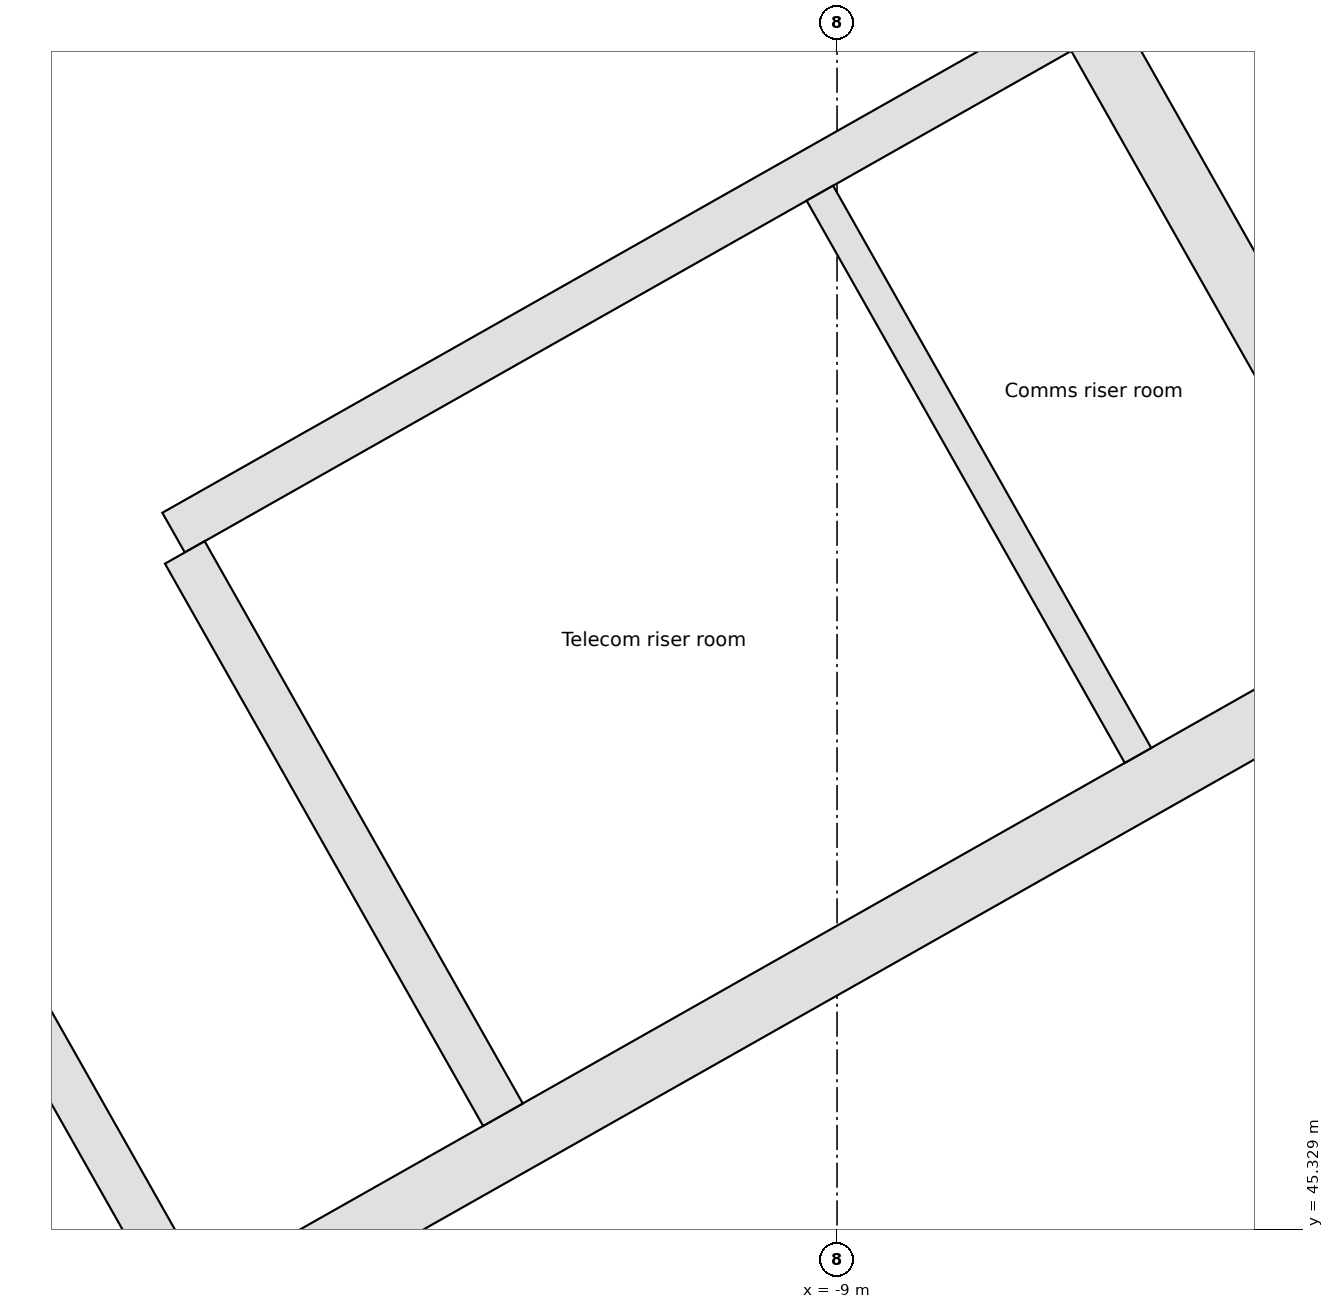
"""IFC4 building model, lengths in metres.
Left out: names, types, materials, properties, quantities, classifications, styles, units other than length and angle.
Written with IfcOpenShell. Run it as: python <this file> out.ifc"""

import sys

from ifc_helpers import new_model, si_unit, direction, frame, frame_2d, origin, place, context, subcontext, project, spatial, rectangle, extrude, element, fill, save


model = new_model("IFC4")
c1 = context("Model", 3, precision=1e-05, world=origin(), true_north=direction((0.0, 1.0)))
c2 = subcontext(c1, "Body", "Model", "MODEL_VIEW")
j1 = project(units=[si_unit("LENGTHUNIT", "METRE"), si_unit("PLANEANGLEUNIT", "RADIAN")], contexts=[c1])
p1 = place(None, origin())
s1 = spatial("IfcSite", under=j1, at=p1, CompositionType="ELEMENT")
p2 = place(p1, origin())
s2 = spatial("IfcBuilding", under=s1, at=p2, CompositionType="ELEMENT")
p3 = place(p2, frame((0.0, 0.0, 277.9)))
s3 = spatial("IfcBuildingStorey", under=s2, at=p3, CompositionType="ELEMENT", Elevation=277.9)
p4 = place(p3, frame((-58.732, 38.771, 0.0), z_axis=(0.0, 0.0, 1.0), x_axis=(0.870355615581, 0.492423702137, 0.0)))
e1 = element("IfcWall", 1, at=p4, inside=s3, PredefinedType="STANDARD", context=c2, shape_type="SweptSolid", body=[
    extrude(rectangle(XDim=64.052, YDim=0.25, at=frame_2d((32.026, 0.0))), origin(), (0.0, 0.0, 1.0), 3.52),
])
p5 = place(p4, frame((61.259, 0.0, 0.8)))
e2 = element("IfcOpeningElement", 2, at=p5, cuts=e1, PredefinedType="OPENING", context=c2, shape_type="SweptSolid", body=[
    extrude(rectangle(XDim=2.4, YDim=2.2, at=frame_2d((1.2, 1.1))), frame((0.0, 0.135, 0.0), z_axis=(0.0, -1.0, 0.0), x_axis=(1.0, 0.0, 0.0)), (0.0, 0.0, 1.0), 0.27),
])
p6 = place(p4, frame((58.216, 0.0, 0.8)))
e3 = element("IfcOpeningElement", 3, at=p6, cuts=e1, PredefinedType="OPENING", context=c2, shape_type="SweptSolid", body=[
    extrude(rectangle(XDim=2.4, YDim=2.2, at=frame_2d((1.2, 1.1))), frame((0.0, 0.135, 0.0), z_axis=(0.0, -1.0, 0.0), x_axis=(1.0, 0.0, 0.0)), (0.0, 0.0, 1.0), 0.27),
])
p7 = place(p4, frame((55.173, 0.0, 0.8)))
e4 = element("IfcOpeningElement", 4, at=p7, cuts=e1, PredefinedType="OPENING", context=c2, shape_type="SweptSolid", body=[
    extrude(rectangle(XDim=2.4, YDim=2.2, at=frame_2d((1.2, 1.1))), frame((0.0, 0.135, 0.0), z_axis=(0.0, -1.0, 0.0), x_axis=(1.0, 0.0, 0.0)), (0.0, 0.0, 1.0), 0.27),
])
p8 = place(p4, frame((52.129, 0.0, 0.8)))
e5 = element("IfcOpeningElement", 5, at=p8, cuts=e1, PredefinedType="OPENING", context=c2, shape_type="SweptSolid", body=[
    extrude(rectangle(XDim=2.4, YDim=2.2, at=frame_2d((1.2, 1.1))), frame((0.0, 0.135, 0.0), z_axis=(0.0, -1.0, 0.0), x_axis=(1.0, 0.0, 0.0)), (0.0, 0.0, 1.0), 0.27),
])
p9 = place(p4, frame((49.086, 0.0, 0.8)))
e6 = element("IfcOpeningElement", 6, at=p9, cuts=e1, PredefinedType="OPENING", context=c2, shape_type="SweptSolid", body=[
    extrude(rectangle(XDim=2.4, YDim=2.2, at=frame_2d((1.2, 1.1))), frame((0.0, 0.135, 0.0), z_axis=(0.0, -1.0, 0.0), x_axis=(1.0, 0.0, 0.0)), (0.0, 0.0, 1.0), 0.27),
])
p10 = place(p4, frame((46.043, 0.0, 0.8)))
e7 = element("IfcOpeningElement", 7, at=p10, cuts=e1, PredefinedType="OPENING", context=c2, shape_type="SweptSolid", body=[
    extrude(rectangle(XDim=2.4, YDim=2.2, at=frame_2d((1.2, 1.1))), frame((0.0, 0.135, 0.0), z_axis=(0.0, -1.0, 0.0), x_axis=(1.0, 0.0, 0.0)), (0.0, 0.0, 1.0), 0.27),
])
p11 = place(p4, frame((43.0, 0.0, 0.8)))
e8 = element("IfcOpeningElement", 8, at=p11, cuts=e1, PredefinedType="OPENING", context=c2, shape_type="SweptSolid", body=[
    extrude(rectangle(XDim=2.4, YDim=2.2, at=frame_2d((1.2, 1.1))), frame((0.0, 0.135, 0.0), z_axis=(0.0, -1.0, 0.0), x_axis=(1.0, 0.0, 0.0)), (0.0, 0.0, 1.0), 0.27),
])
p12 = place(p4, frame((39.956, 0.0, 0.8)))
e9 = element("IfcOpeningElement", 9, at=p12, cuts=e1, PredefinedType="OPENING", context=c2, shape_type="SweptSolid", body=[
    extrude(rectangle(XDim=2.4, YDim=2.2, at=frame_2d((1.2, 1.1))), frame((0.0, 0.135, 0.0), z_axis=(0.0, -1.0, 0.0), x_axis=(1.0, 0.0, 0.0)), (0.0, 0.0, 1.0), 0.27),
])
p13 = place(p4, frame((36.913, 0.0, 0.8)))
e10 = element("IfcOpeningElement", 10, at=p13, cuts=e1, PredefinedType="OPENING", context=c2, shape_type="SweptSolid", body=[
    extrude(rectangle(XDim=2.4, YDim=2.2, at=frame_2d((1.2, 1.1))), frame((0.0, 0.135, 0.0), z_axis=(0.0, -1.0, 0.0), x_axis=(1.0, 0.0, 0.0)), (0.0, 0.0, 1.0), 0.27),
])
p14 = place(p4, frame((33.87, 0.0, 0.8)))
e11 = element("IfcOpeningElement", 11, at=p14, cuts=e1, PredefinedType="OPENING", context=c2, shape_type="SweptSolid", body=[
    extrude(rectangle(XDim=2.4, YDim=2.2, at=frame_2d((1.2, 1.1))), frame((0.0, 0.135, 0.0), z_axis=(0.0, -1.0, 0.0), x_axis=(1.0, 0.0, 0.0)), (0.0, 0.0, 1.0), 0.27),
])
p15 = place(p4, frame((30.826, 0.0, 0.8)))
e12 = element("IfcOpeningElement", 12, at=p15, cuts=e1, PredefinedType="OPENING", context=c2, shape_type="SweptSolid", body=[
    extrude(rectangle(XDim=2.4, YDim=2.2, at=frame_2d((1.2, 1.1))), frame((0.0, 0.135, 0.0), z_axis=(0.0, -1.0, 0.0), x_axis=(1.0, 0.0, 0.0)), (0.0, 0.0, 1.0), 0.27),
])
p16 = place(p4, frame((27.783, 0.0, 0.8)))
e13 = element("IfcOpeningElement", 13, at=p16, cuts=e1, PredefinedType="OPENING", context=c2, shape_type="SweptSolid", body=[
    extrude(rectangle(XDim=2.4, YDim=2.2, at=frame_2d((1.2, 1.1))), frame((0.0, 0.135, 0.0), z_axis=(0.0, -1.0, 0.0), x_axis=(1.0, 0.0, 0.0)), (0.0, 0.0, 1.0), 0.27),
])
p17 = place(p4, frame((24.74, 0.0, 0.8)))
e14 = element("IfcOpeningElement", 14, at=p17, cuts=e1, PredefinedType="OPENING", context=c2, shape_type="SweptSolid", body=[
    extrude(rectangle(XDim=2.4, YDim=2.2, at=frame_2d((1.2, 1.1))), frame((0.0, 0.135, 0.0), z_axis=(0.0, -1.0, 0.0), x_axis=(1.0, 0.0, 0.0)), (0.0, 0.0, 1.0), 0.27),
])
p18 = place(p4, frame((21.696, 0.0, 0.8)))
e15 = element("IfcOpeningElement", 15, at=p18, cuts=e1, PredefinedType="OPENING", context=c2, shape_type="SweptSolid", body=[
    extrude(rectangle(XDim=2.4, YDim=2.2, at=frame_2d((1.2, 1.1))), frame((0.0, 0.135, 0.0), z_axis=(0.0, -1.0, 0.0), x_axis=(1.0, 0.0, 0.0)), (0.0, 0.0, 1.0), 0.27),
])
p19 = place(p4, frame((18.653, 0.0, 0.8)))
e16 = element("IfcOpeningElement", 16, at=p19, cuts=e1, PredefinedType="OPENING", context=c2, shape_type="SweptSolid", body=[
    extrude(rectangle(XDim=2.4, YDim=2.2, at=frame_2d((1.2, 1.1))), frame((0.0, 0.135, 0.0), z_axis=(0.0, -1.0, 0.0), x_axis=(1.0, 0.0, 0.0)), (0.0, 0.0, 1.0), 0.27),
])
p20 = place(p4, frame((15.61, 0.0, 0.8)))
e17 = element("IfcOpeningElement", 17, at=p20, cuts=e1, PredefinedType="OPENING", context=c2, shape_type="SweptSolid", body=[
    extrude(rectangle(XDim=2.4, YDim=2.2, at=frame_2d((1.2, 1.1))), frame((0.0, 0.135, 0.0), z_axis=(0.0, -1.0, 0.0), x_axis=(1.0, 0.0, 0.0)), (0.0, 0.0, 1.0), 0.27),
])
p21 = place(p4, frame((12.567, 0.0, 0.8)))
e18 = element("IfcOpeningElement", 18, at=p21, cuts=e1, PredefinedType="OPENING", context=c2, shape_type="SweptSolid", body=[
    extrude(rectangle(XDim=2.4, YDim=2.2, at=frame_2d((1.2, 1.1))), frame((0.0, 0.135, 0.0), z_axis=(0.0, -1.0, 0.0), x_axis=(1.0, 0.0, 0.0)), (0.0, 0.0, 1.0), 0.27),
])
p22 = place(p4, frame((9.523, 0.0, 0.8)))
e19 = element("IfcOpeningElement", 19, at=p22, cuts=e1, PredefinedType="OPENING", context=c2, shape_type="SweptSolid", body=[
    extrude(rectangle(XDim=2.4, YDim=2.2, at=frame_2d((1.2, 1.1))), frame((0.0, 0.135, 0.0), z_axis=(0.0, -1.0, 0.0), x_axis=(1.0, 0.0, 0.0)), (0.0, 0.0, 1.0), 0.27),
])
p23 = place(p4, frame((6.48, 0.0, 0.8)))
e20 = element("IfcOpeningElement", 20, at=p23, cuts=e1, PredefinedType="OPENING", context=c2, shape_type="SweptSolid", body=[
    extrude(rectangle(XDim=2.4, YDim=2.2, at=frame_2d((1.2, 1.1))), frame((0.0, 0.135, 0.0), z_axis=(0.0, -1.0, 0.0), x_axis=(1.0, 0.0, 0.0)), (0.0, 0.0, 1.0), 0.27),
])
p24 = place(p4, frame((3.437, 0.0, 0.8)))
e21 = element("IfcOpeningElement", 21, at=p24, cuts=e1, PredefinedType="OPENING", context=c2, shape_type="SweptSolid", body=[
    extrude(rectangle(XDim=2.4, YDim=2.2, at=frame_2d((1.2, 1.1))), frame((0.0, 0.135, 0.0), z_axis=(0.0, -1.0, 0.0), x_axis=(1.0, 0.0, 0.0)), (0.0, 0.0, 1.0), 0.27),
])
p25 = place(p4, frame((0.393, 0.0, 0.8)))
e22 = element("IfcOpeningElement", 22, at=p25, cuts=e1, PredefinedType="OPENING", context=c2, shape_type="SweptSolid", body=[
    extrude(rectangle(XDim=2.4, YDim=2.2, at=frame_2d((1.2, 1.1))), frame((0.0, 0.135, 0.0), z_axis=(0.0, -1.0, 0.0), x_axis=(1.0, 0.0, 0.0)), (0.0, 0.0, 1.0), 0.27),
])
p26 = place(p3, frame((-3.017, 46.293, 0.0), z_axis=(0.0, 0.0, 1.0), x_axis=(-0.870355474887, -0.492423950812, 0.0)))
e23 = element("IfcWall", 23, at=p26, inside=s3, PredefinedType="STANDARD", context=c2, shape_type="SweptSolid", body=[
    extrude(rectangle(XDim=40.34, YDim=0.25, at=frame_2d((20.17, 0.0))), origin(), (0.0, 0.0, 1.0), 3.52),
])
p27 = place(p26, frame((37.428, 0.0, 0.8)))
e24 = element("IfcOpeningElement", 24, at=p27, cuts=e23, PredefinedType="OPENING", context=c2, shape_type="SweptSolid", body=[
    extrude(rectangle(XDim=2.4, YDim=2.2, at=frame_2d((1.2, 1.1))), frame((0.0, 0.135, 0.0), z_axis=(0.0, -1.0, 0.0), x_axis=(1.0, 0.0, 0.0)), (0.0, 0.0, 1.0), 0.27),
])
p28 = place(p26, frame((34.372, 0.0, 0.0)))
e25 = element("IfcOpeningElement", 25, at=p28, cuts=e23, PredefinedType="OPENING", context=c2, shape_type="SweptSolid", body=[
    extrude(rectangle(XDim=1.8, YDim=2.4, at=frame_2d((0.9, 1.2))), frame((0.0, 0.135, 0.0), z_axis=(0.0, -1.0, 0.0), x_axis=(1.0, 0.0, 0.0)), (0.0, 0.0, 1.0), 0.27),
])
p29 = place(p26, frame((30.716, 0.0, 0.8)))
e26 = element("IfcOpeningElement", 26, at=p29, cuts=e23, PredefinedType="OPENING", context=c2, shape_type="SweptSolid", body=[
    extrude(rectangle(XDim=2.4, YDim=2.2, at=frame_2d((1.2, 1.1))), frame((0.0, 0.135, 0.0), z_axis=(0.0, -1.0, 0.0), x_axis=(1.0, 0.0, 0.0)), (0.0, 0.0, 1.0), 0.27),
])
p30 = place(p26, frame((27.36, 0.0, 0.8)))
e27 = element("IfcOpeningElement", 27, at=p30, cuts=e23, PredefinedType="OPENING", context=c2, shape_type="SweptSolid", body=[
    extrude(rectangle(XDim=2.4, YDim=2.2, at=frame_2d((1.2, 1.1))), frame((0.0, 0.135, 0.0), z_axis=(0.0, -1.0, 0.0), x_axis=(1.0, 0.0, 0.0)), (0.0, 0.0, 1.0), 0.27),
])
p31 = place(p26, frame((24.304, 0.0, 0.0)))
e28 = element("IfcOpeningElement", 28, at=p31, cuts=e23, PredefinedType="OPENING", context=c2, shape_type="SweptSolid", body=[
    extrude(rectangle(XDim=1.8, YDim=2.4, at=frame_2d((0.9, 1.2))), frame((0.0, 0.135, 0.0), z_axis=(0.0, -1.0, 0.0), x_axis=(1.0, 0.0, 0.0)), (0.0, 0.0, 1.0), 0.27),
])
p32 = place(p26, frame((20.648, 0.0, 0.8)))
e29 = element("IfcOpeningElement", 29, at=p32, cuts=e23, PredefinedType="OPENING", context=c2, shape_type="SweptSolid", body=[
    extrude(rectangle(XDim=2.4, YDim=2.2, at=frame_2d((1.2, 1.1))), frame((0.0, 0.135, 0.0), z_axis=(0.0, -1.0, 0.0), x_axis=(1.0, 0.0, 0.0)), (0.0, 0.0, 1.0), 0.27),
])
p33 = place(p26, frame((17.292, 0.0, 0.8)))
e30 = element("IfcOpeningElement", 30, at=p33, cuts=e23, PredefinedType="OPENING", context=c2, shape_type="SweptSolid", body=[
    extrude(rectangle(XDim=2.4, YDim=2.2, at=frame_2d((1.2, 1.1))), frame((0.0, 0.135, 0.0), z_axis=(0.0, -1.0, 0.0), x_axis=(1.0, 0.0, 0.0)), (0.0, 0.0, 1.0), 0.27),
])
p34 = place(p26, frame((14.236, 0.0, 0.0)))
e31 = element("IfcOpeningElement", 31, at=p34, cuts=e23, PredefinedType="OPENING", context=c2, shape_type="SweptSolid", body=[
    extrude(rectangle(XDim=1.8, YDim=2.4, at=frame_2d((0.9, 1.2))), frame((0.0, 0.135, 0.0), z_axis=(0.0, -1.0, 0.0), x_axis=(1.0, 0.0, 0.0)), (0.0, 0.0, 1.0), 0.27),
])
p35 = place(p26, frame((10.58, 0.0, 0.8)))
e32 = element("IfcOpeningElement", 32, at=p35, cuts=e23, PredefinedType="OPENING", context=c2, shape_type="SweptSolid", body=[
    extrude(rectangle(XDim=2.4, YDim=2.2, at=frame_2d((1.2, 1.1))), frame((0.0, 0.135, 0.0), z_axis=(0.0, -1.0, 0.0), x_axis=(1.0, 0.0, 0.0)), (0.0, 0.0, 1.0), 0.27),
])
p36 = place(p26, frame((7.224, 0.0, 0.8)))
e33 = element("IfcOpeningElement", 33, at=p36, cuts=e23, PredefinedType="OPENING", context=c2, shape_type="SweptSolid", body=[
    extrude(rectangle(XDim=2.4, YDim=2.2, at=frame_2d((1.2, 1.1))), frame((0.0, 0.135, 0.0), z_axis=(0.0, -1.0, 0.0), x_axis=(1.0, 0.0, 0.0)), (0.0, 0.0, 1.0), 0.27),
])
p37 = place(p26, frame((4.168, 0.0, 0.0)))
e34 = element("IfcOpeningElement", 34, at=p37, cuts=e23, PredefinedType="OPENING", context=c2, shape_type="SweptSolid", body=[
    extrude(rectangle(XDim=1.8, YDim=2.4, at=frame_2d((0.9, 1.2))), frame((0.0, 0.135, 0.0), z_axis=(0.0, -1.0, 0.0), x_axis=(1.0, 0.0, 0.0)), (0.0, 0.0, 1.0), 0.27),
])
p38 = place(p26, frame((0.512, 0.0, 0.8)))
e35 = element("IfcOpeningElement", 35, at=p38, cuts=e23, PredefinedType="OPENING", context=c2, shape_type="SweptSolid", body=[
    extrude(rectangle(XDim=2.4, YDim=2.2, at=frame_2d((1.2, 1.1))), frame((0.0, 0.135, 0.0), z_axis=(0.0, -1.0, 0.0), x_axis=(1.0, 0.0, 0.0)), (0.0, 0.0, 1.0), 0.27),
])
p39 = place(p3, frame((-17.975, 42.017, 0.0), z_axis=(0.0, 0.0, 1.0), x_axis=(0.87034965173, 0.492434243055, 0.0)))
e36 = element("IfcWall", 36, at=p39, inside=s3, PredefinedType="SOLIDWALL", context=c2, shape_type="SweptSolid", body=[
    extrude(rectangle(XDim=15.0, YDim=0.4, at=frame_2d((7.5, 0.0))), origin(), (0.0, 0.0, 1.0), 3.52),
])
p40 = place(p39, frame((6.1, 0.0, 0.0)))
e37 = element("IfcOpeningElement", 37, at=p40, cuts=e36, PredefinedType="OPENING", context=c2, shape_type="SweptSolid", body=[
    extrude(rectangle(XDim=1.2, YDim=2.1, at=frame_2d((0.6, 1.05))), frame((0.0, 0.21, 0.0), z_axis=(0.0, -1.0, 0.0), x_axis=(1.0, 0.0, 0.0)), (0.0, 0.0, 1.0), 0.42),
])
p41 = place(p3, frame((-13.365, 49.911, 0.0), z_axis=(0.0, 0.0, 1.0), x_axis=(0.870347618718, 0.492437836272, 0.0)))
e38 = element("IfcWall", 38, at=p41, inside=s3, PredefinedType="SOLIDWALL", context=c2, shape_type="SweptSolid", body=[
    extrude(rectangle(XDim=6.7, YDim=0.3, at=frame_2d((3.35, 0.0))), origin(), (0.0, 0.0, 1.0), 3.52),
])
p42 = place(p41, frame((1.95, 0.0, 0.0)))
e39 = element("IfcOpeningElement", 39, at=p42, cuts=e38, PredefinedType="OPENING", context=c2, shape_type="SweptSolid", body=[
    extrude(rectangle(XDim=0.9, YDim=2.1, at=frame_2d((0.45, 1.05))), frame((0.0, 0.16, 0.0), z_axis=(0.0, -1.0, 0.0), x_axis=(1.0, 0.0, 0.0)), (0.0, 0.0, 1.0), 0.32),
])
p43 = place(p41, frame((5.35, 0.0, 0.0)))
e40 = element("IfcOpeningElement", 40, at=p43, cuts=e38, PredefinedType="OPENING", context=c2, shape_type="SweptSolid", body=[
    extrude(rectangle(XDim=0.9, YDim=2.1, at=frame_2d((0.45, 1.05))), frame((0.0, 0.16, 0.0), z_axis=(0.0, -1.0, 0.0), x_axis=(1.0, 0.0, 0.0)), (0.0, 0.0, 1.0), 0.32),
])
p44 = place(p3, frame((-15.379, 48.599, 0.0), z_axis=(0.0, 0.0, 1.0), x_axis=(0.492422543467, -0.870356271124, 0.0)))
e41 = element("IfcWall", 41, at=p44, inside=s3, PredefinedType="SOLIDWALL", context=c2, shape_type="SweptSolid", body=[
    extrude(rectangle(XDim=4.25, YDim=0.3, at=frame_2d((2.125, 0.0))), origin(), (0.0, 0.0, 1.0), 3.52),
])
p45 = place(p3, frame((-13.291, 49.781, 0.0), z_axis=(0.0, 0.0, 1.0), x_axis=(0.492397924348, -0.870370199454, 0.0)))
e42 = element("IfcWall", 42, at=p45, inside=s3, PredefinedType="SOLIDWALL", context=c2, shape_type="SweptSolid", body=[
    extrude(rectangle(XDim=4.25, YDim=0.3, at=frame_2d((2.125, 0.0))), origin(), (0.0, 0.0, 1.0), 3.52),
])
p46 = place(p3, frame((-9.113, 52.144, 0.0), z_axis=(0.0, 0.0, 1.0), x_axis=(0.492422543467, -0.870356271124, 0.0)))
e43 = element("IfcWall", 43, at=p46, inside=s3, PredefinedType="PARTITIONING", context=c2, shape_type="SweptSolid", body=[
    extrude(rectangle(XDim=4.25, YDim=0.2, at=frame_2d((2.125, 0.0))), origin(), (0.0, 0.0, 1.0), 3.52),
])
p47 = place(p3, frame((-11.692, 60.968, 0.0), z_axis=(0.0, 0.0, 1.0), x_axis=(0.492421663121, -0.870356769198, 0.0)))
e44 = element("IfcWall", 44, at=p47, inside=s3, PredefinedType="SOLIDWALL", context=c2, shape_type="SweptSolid", body=[
    extrude(rectangle(XDim=13.2, YDim=0.4, at=frame_2d((6.6, 0.0))), origin(), (0.0, 0.0, 1.0), 3.52),
])
p48 = place(p40, frame((1.2, 0.0, 0.0), z_axis=(0.0, 0.0, 1.0), x_axis=(-1.0, 0.0, 0.0)))
e45 = element("IfcDoor", 45, at=p48, inside=s3, OperationType="SINGLE_SWING_RIGHT", PredefinedType="DOOR", context=c2, shape_type="SweptSolid", body=[
    extrude(rectangle(XDim=1.2, YDim=2.1, at=frame_2d((0.6, 1.05))), frame((0.0, 0.025, 0.0), z_axis=(0.0, -1.0, 0.0), x_axis=(1.0, 0.0, 0.0)), (0.0, 0.0, 1.0), 0.05),
])
fill(e37, e45)
p49 = place(p42, frame((0.9, 0.0, 0.0), z_axis=(0.0, 0.0, 1.0), x_axis=(-1.0, 0.0, 0.0)))
e46 = element("IfcDoor", 46, at=p49, inside=s3, OperationType="SINGLE_SWING_RIGHT", PredefinedType="DOOR", context=c2, shape_type="SweptSolid", body=[
    extrude(rectangle(XDim=0.9, YDim=2.1, at=frame_2d((0.45, 1.05))), frame((0.0, 0.025, 0.0), z_axis=(0.0, -1.0, 0.0), x_axis=(1.0, 0.0, 0.0)), (0.0, 0.0, 1.0), 0.05),
])
fill(e39, e46)
p50 = place(p43, frame((0.9, 0.0, 0.0), z_axis=(0.0, 0.0, 1.0), x_axis=(-1.0, 0.0, 0.0)))
e47 = element("IfcDoor", 47, at=p50, inside=s3, OperationType="SINGLE_SWING_LEFT", PredefinedType="DOOR", context=c2, shape_type="SweptSolid", body=[
    extrude(rectangle(XDim=0.9, YDim=2.1, at=frame_2d((0.45, 1.05))), frame((0.0, 0.025, 0.0), z_axis=(0.0, -1.0, 0.0), x_axis=(1.0, 0.0, 0.0)), (0.0, 0.0, 1.0), 0.05),
])
fill(e40, e47)
save(model, sys.argv[1])
